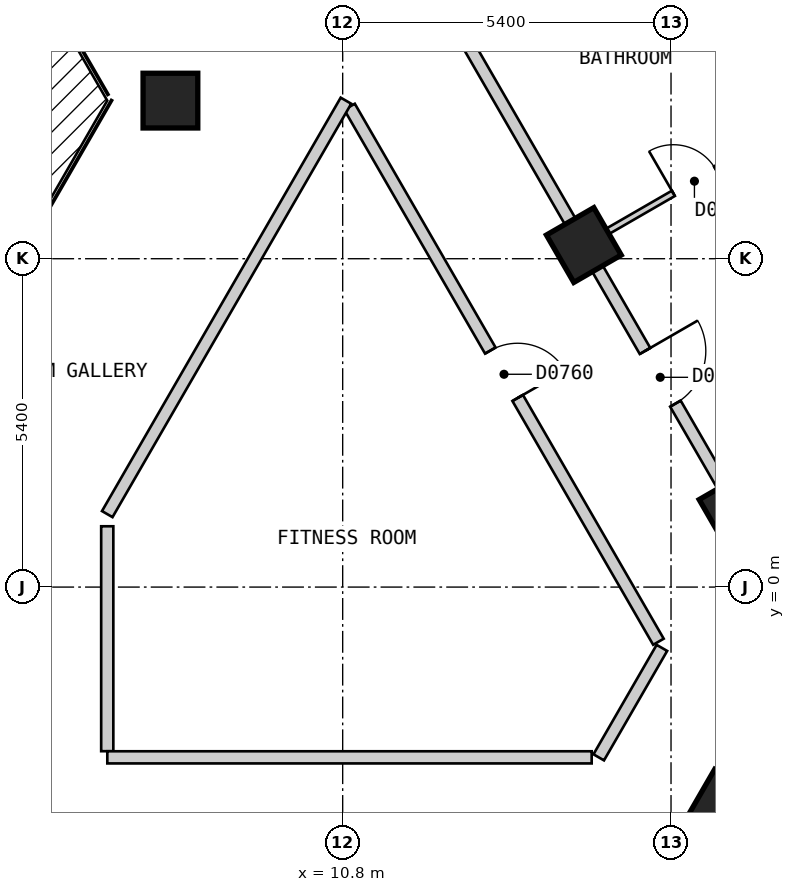
"""IFC4 building model, lengths in metres.
Left out: names, types, materials, properties, quantities, classifications, styles, units other than length and angle.
Written with IfcOpenShell. Run it as: python <this file> out.ifc"""

import sys

from ifc_helpers import new_model, si_unit, direction, frame, frame_2d, origin, origin_2d, place, context, subcontext, project, spatial, polyline, rectangle, outline, extrude, element, fill, save


model = new_model("IFC4")
c1 = context("Model", 3, precision=1e-05, world=origin(), true_north=direction((0.0, 1.0)))
c2 = subcontext(c1, "Body", "Model", "MODEL_VIEW")
j1 = project(units=[si_unit("LENGTHUNIT", "METRE"), si_unit("PLANEANGLEUNIT", "RADIAN")], contexts=[c1])
p1 = place(None, origin())
s1 = spatial("IfcSite", under=j1, at=p1, CompositionType="ELEMENT")
p2 = place(p1, origin())
s2 = spatial("IfcBuilding", under=s1, at=p2, CompositionType="ELEMENT")
p3 = place(p2, frame((0.0, 0.0, 105.0)))
s3 = spatial("IfcBuildingStorey", under=s2, at=p3, CompositionType="ELEMENT", Elevation=105.0)
for number, where, z_axis, x_axis in (
    (1, (17.083, -3.612, 0.0), (0.0, 0.0, 1.0), (0.5, 0.866, 0.0)),
    (2, (17.278, 1.274, 0.0), (0.0, 0.0, 1.0), (-0.5, 0.866, 0.0)),
    (3, (14.766, 5.625, 0.0), (0.0, 0.0, 1.0), (-0.5, 0.866, 0.0)),
    (4, (7.967, 8.0, 0.0), (0.0, 0.0, 1.0), (1.0, 0.0, 0.0)),
):
    element("IfcColumn", number, at=place(p3, frame(where, z_axis=z_axis, x_axis=x_axis)), inside=s3, PredefinedType="COLUMN", context=c2, shape_type="SweptSolid", body=[
        extrude(rectangle(XDim=0.9, YDim=0.9, at=origin_2d()), origin(), (0.0, 0.0, 1.0), 3.0),
    ])
p4 = place(p3, frame((29.027, 1.425, 0.0), z_axis=(0.0, 0.0, 1.0), x_axis=(-0.500027479704, 0.866009537788, 0.0)))
e5 = element("IfcWall", 5, at=p4, inside=s3, PredefinedType="SOLIDWALL", context=c2, shape_type="SweptSolid", body=[
    extrude(outline(polyline([(0.0, -0.15), (26.559, -0.15), (26.478, 0.15), (0.08, 0.15), (0.0, -0.15)])), origin(), (0.0, 0.0, 1.0), 2.6),
])
p5 = place(p4, frame((1.227, 0.0, 0.15)))
e6 = element("IfcOpeningElement", 6, at=p5, cuts=e5, PredefinedType="OPENING", context=c2, shape_type="SweptSolid", body=[
    extrude(rectangle(XDim=1.5, YDim=2.1, at=frame_2d((0.75, 1.05))), frame((0.0, 0.16, 0.0), z_axis=(0.0, -1.0, 0.0), x_axis=(1.0, 0.0, 0.0)), (0.0, 0.0, 1.0), 0.32),
])
p6 = place(p4, frame((3.738, 0.0, 0.15)))
e7 = element("IfcOpeningElement", 7, at=p6, cuts=e5, PredefinedType="OPENING", context=c2, shape_type="SweptSolid", body=[
    extrude(rectangle(XDim=1.5, YDim=2.1, at=frame_2d((0.75, 1.05))), frame((0.0, 0.16, 0.0), z_axis=(0.0, -1.0, 0.0), x_axis=(1.0, 0.0, 0.0)), (0.0, 0.0, 1.0), 0.32),
])
p7 = place(p4, frame((6.25, 0.0, 0.15)))
e8 = element("IfcOpeningElement", 8, at=p7, cuts=e5, PredefinedType="OPENING", context=c2, shape_type="SweptSolid", body=[
    extrude(rectangle(XDim=1.5, YDim=2.1, at=frame_2d((0.75, 1.05))), frame((0.0, 0.16, 0.0), z_axis=(0.0, -1.0, 0.0), x_axis=(1.0, 0.0, 0.0)), (0.0, 0.0, 1.0), 0.32),
])
p8 = place(p4, frame((8.761, 0.0, 0.15)))
e9 = element("IfcOpeningElement", 9, at=p8, cuts=e5, PredefinedType="OPENING", context=c2, shape_type="SweptSolid", body=[
    extrude(rectangle(XDim=1.5, YDim=2.1, at=frame_2d((0.75, 1.05))), frame((0.0, 0.16, 0.0), z_axis=(0.0, -1.0, 0.0), x_axis=(1.0, 0.0, 0.0)), (0.0, 0.0, 1.0), 0.32),
])
p9 = place(p4, frame((11.273, 0.0, 0.15)))
e10 = element("IfcOpeningElement", 10, at=p9, cuts=e5, PredefinedType="OPENING", context=c2, shape_type="SweptSolid", body=[
    extrude(rectangle(XDim=1.5, YDim=2.1, at=frame_2d((0.75, 1.05))), frame((0.0, 0.16, 0.0), z_axis=(0.0, -1.0, 0.0), x_axis=(1.0, 0.0, 0.0)), (0.0, 0.0, 1.0), 0.32),
])
p10 = place(p4, frame((13.785, 0.0, 0.15)))
e11 = element("IfcOpeningElement", 11, at=p10, cuts=e5, PredefinedType="OPENING", context=c2, shape_type="SweptSolid", body=[
    extrude(rectangle(XDim=1.5, YDim=2.1, at=frame_2d((0.75, 1.05))), frame((0.0, 0.16, 0.0), z_axis=(0.0, -1.0, 0.0), x_axis=(1.0, 0.0, 0.0)), (0.0, 0.0, 1.0), 0.32),
])
p11 = place(p4, frame((16.296, 0.0, 0.15)))
e12 = element("IfcOpeningElement", 12, at=p11, cuts=e5, PredefinedType="OPENING", context=c2, shape_type="SweptSolid", body=[
    extrude(rectangle(XDim=1.5, YDim=2.1, at=frame_2d((0.75, 1.05))), frame((0.0, 0.16, 0.0), z_axis=(0.0, -1.0, 0.0), x_axis=(1.0, 0.0, 0.0)), (0.0, 0.0, 1.0), 0.32),
])
p12 = place(p4, frame((18.807, 0.0, 0.15)))
e13 = element("IfcOpeningElement", 13, at=p12, cuts=e5, PredefinedType="OPENING", context=c2, shape_type="SweptSolid", body=[
    extrude(rectangle(XDim=1.5, YDim=2.1, at=frame_2d((0.75, 1.05))), frame((0.0, 0.16, 0.0), z_axis=(0.0, -1.0, 0.0), x_axis=(1.0, 0.0, 0.0)), (0.0, 0.0, 1.0), 0.32),
])
p13 = place(p4, frame((21.319, 0.0, 0.15)))
e14 = element("IfcOpeningElement", 14, at=p13, cuts=e5, PredefinedType="OPENING", context=c2, shape_type="SweptSolid", body=[
    extrude(rectangle(XDim=1.5, YDim=2.1, at=frame_2d((0.75, 1.05))), frame((0.0, 0.16, 0.0), z_axis=(0.0, -1.0, 0.0), x_axis=(1.0, 0.0, 0.0)), (0.0, 0.0, 1.0), 0.32),
])
p14 = place(p4, frame((23.831, 0.0, 0.15)))
e15 = element("IfcOpeningElement", 15, at=p14, cuts=e5, PredefinedType="OPENING", context=c2, shape_type="SweptSolid", body=[
    extrude(rectangle(XDim=1.5, YDim=2.1, at=frame_2d((0.75, 1.05))), frame((0.0, 0.16, 0.0), z_axis=(0.0, -1.0, 0.0), x_axis=(1.0, 0.0, 0.0)), (0.0, 0.0, 1.0), 0.32),
])
p15 = place(p3, frame((10.913, 7.899, 0.0), z_axis=(0.0, 0.0, 1.0), x_axis=(0.500028940566, -0.866008694296, 0.0)))
e16 = element("IfcWall", 16, at=p15, inside=s3, PredefinedType="PARTITIONING", context=c2, shape_type="SweptSolid", body=[
    extrude(rectangle(XDim=10.159, YDim=0.2, at=frame_2d((5.08, 0.0))), origin(), (0.0, 0.0, 1.0), 2.6),
])
p16 = place(p15, frame((4.63, 0.0, 0.0)))
e17 = element("IfcOpeningElement", 17, at=p16, cuts=e16, PredefinedType="OPENING", context=c2, shape_type="SweptSolid", body=[
    extrude(rectangle(XDim=0.9, YDim=2.1, at=frame_2d((0.45, 1.05))), frame((0.0, 0.11, 0.0), z_axis=(0.0, -1.0, 0.0), x_axis=(1.0, 0.0, 0.0)), (0.0, 0.0, 1.0), 0.22),
])
p17 = place(p3, frame((8.488, 16.5, 0.0), z_axis=(0.0, 0.0, 1.0), x_axis=(0.499986836607, -0.86603300354, 0.0)))
e18 = element("IfcWall", 18, at=p17, inside=s3, PredefinedType="PARTITIONING", context=c2, shape_type="SweptSolid", body=[
    extrude(rectangle(XDim=20.09, YDim=0.2, at=frame_2d((10.045, 0.0))), origin(), (0.0, 0.0, 1.0), 2.6),
])
p18 = place(p17, frame((14.569, 0.0, 0.0)))
e19 = element("IfcOpeningElement", 19, at=p18, cuts=e18, PredefinedType="OPENING", context=c2, shape_type="SweptSolid", body=[
    extrude(rectangle(XDim=1.0, YDim=2.1, at=frame_2d((0.5, 1.05))), frame((0.0, 0.11, 0.0), z_axis=(0.0, -1.0, 0.0), x_axis=(1.0, 0.0, 0.0)), (0.0, 0.0, 1.0), 0.22),
])
p19 = place(p17, frame((4.547, 0.0, 0.0)))
e20 = element("IfcOpeningElement", 20, at=p19, cuts=e18, PredefinedType="OPENING", context=c2, shape_type="SweptSolid", body=[
    extrude(rectangle(XDim=1.0, YDim=2.1, at=frame_2d((0.5, 1.05))), frame((0.0, 0.11, 0.0), z_axis=(0.0, -1.0, 0.0), x_axis=(1.0, 0.0, 0.0)), (0.0, 0.0, 1.0), 0.22),
])
p20 = place(p3, frame((6.928, 1.0, 0.0), z_axis=(0.0, 0.0, 1.0), x_axis=(0.0, -1.0, 0.0)))
e21 = element("IfcWall", 21, at=p20, inside=s3, PredefinedType="PARTITIONING", context=c2, shape_type="SweptSolid", body=[
    extrude(rectangle(XDim=3.699, YDim=0.2, at=frame_2d((1.85, 0.0))), origin(), (0.0, 0.0, 1.0), 2.6),
])
p21 = place(p3, frame((6.929, -2.8, 0.0), z_axis=(0.0, 0.0, 1.0), x_axis=(1.0, 0.0, 0.0)))
e22 = element("IfcWall", 22, at=p21, inside=s3, PredefinedType="PARTITIONING", context=c2, shape_type="SweptSolid", body=[
    extrude(rectangle(XDim=7.966, YDim=0.2, at=frame_2d((3.983, 0.0))), origin(), (0.0, 0.0, 1.0), 2.6),
])
p22 = place(p3, frame((6.928, 1.2, 0.0), z_axis=(0.0, 0.0, 1.0), x_axis=(0.500055327065, 0.865993458332, 0.0)))
e23 = element("IfcWall", 23, at=p22, inside=s3, PredefinedType="PARTITIONING", context=c2, shape_type="SweptSolid", body=[
    extrude(rectangle(XDim=7.851, YDim=0.2, at=frame_2d((3.926, 0.0))), origin(), (0.0, 0.0, 1.0), 2.6),
])
p23 = place(p3, frame((15.011, -2.8, 0.0), z_axis=(0.0, 0.0, 1.0), x_axis=(0.499929208183, 0.866066271601, 0.0)))
e24 = element("IfcWall", 24, at=p23, inside=s3, PredefinedType="PARTITIONING", context=c2, shape_type="SweptSolid", body=[
    extrude(rectangle(XDim=2.078, YDim=0.2, at=frame_2d((1.039, 0.0))), origin(), (0.0, 0.0, 1.0), 2.6),
])
p24 = place(p3, frame((15.771, -5.884, 0.0), z_axis=(0.0, 0.0, 1.0), x_axis=(0.499917542299, 0.866073005526, 0.0)))
e25 = element("IfcWall", 25, at=p24, inside=s3, PredefinedType="PARTITIONING", context=c2, shape_type="SweptSolid", body=[
    extrude(rectangle(XDim=5.525, YDim=0.2, at=frame_2d((2.762, 0.0))), origin(), (0.0, 0.0, 1.0), 2.6),
])
p25 = place(p3, frame((15.942, 11.988, 0.0), z_axis=(0.0, 0.0, 1.0), x_axis=(0.499995794706, -0.866027831699, 0.0)))
e26 = element("IfcWall", 26, at=p25, inside=s3, PredefinedType="PARTITIONING", context=c2, shape_type="SweptSolid", body=[
    extrude(rectangle(XDim=4.922, YDim=0.1, at=frame_2d((2.461, 0.0))), origin(), (0.0, 0.0, 1.0), 2.6),
])
p26 = place(p3, frame((14.853, 5.675, 0.0), z_axis=(0.0, 0.0, 1.0), x_axis=(0.866016855193, 0.500014806302, 0.0)))
e27 = element("IfcWall", 27, at=p26, inside=s3, PredefinedType="PARTITIONING", context=c2, shape_type="SweptSolid", body=[
    extrude(rectangle(XDim=10.0, YDim=0.1, at=frame_2d((5.0, 0.0))), origin(), (0.0, 0.0, 1.0), 2.6),
])
p27 = place(p26, frame((1.6, 0.0, 0.0)))
e28 = element("IfcOpeningElement", 28, at=p27, cuts=e27, PredefinedType="OPENING", context=c2, shape_type="SweptSolid", body=[
    extrude(rectangle(XDim=0.8, YDim=2.1, at=frame_2d((0.4, 1.05))), frame((0.0, 0.06, 0.0), z_axis=(0.0, -1.0, 0.0), x_axis=(1.0, 0.0, 0.0)), (0.0, 0.0, 1.0), 0.12),
])
p28 = place(p26, frame((6.6, 0.0, 0.0)))
e29 = element("IfcOpeningElement", 29, at=p28, cuts=e27, PredefinedType="OPENING", context=c2, shape_type="SweptSolid", body=[
    extrude(rectangle(XDim=0.9, YDim=2.1, at=frame_2d((0.45, 1.05))), frame((0.0, 0.06, 0.0), z_axis=(0.0, -1.0, 0.0), x_axis=(1.0, 0.0, 0.0)), (0.0, 0.0, 1.0), 0.12),
])
p29 = place(p18, origin())
e30 = element("IfcDoor", 30, at=p29, inside=s3, OperationType="SINGLE_SWING_LEFT", PredefinedType="DOOR", context=c2, shape_type="SweptSolid", body=[
    extrude(rectangle(XDim=1.0, YDim=2.1, at=frame_2d((0.5, 1.05))), frame((0.0, 0.025, 0.0), z_axis=(0.0, -1.0, 0.0), x_axis=(1.0, 0.0, 0.0)), (0.0, 0.0, 1.0), 0.05),
])
fill(e19, e30)
p30 = place(p27, origin())
e31 = element("IfcDoor", 31, at=p30, inside=s3, OperationType="SINGLE_SWING_LEFT", PredefinedType="DOOR", context=c2, shape_type="SweptSolid", body=[
    extrude(rectangle(XDim=0.8, YDim=2.1, at=frame_2d((0.4, 1.05))), frame((0.0, 0.025, 0.0), z_axis=(0.0, -1.0, 0.0), x_axis=(1.0, 0.0, 0.0)), (0.0, 0.0, 1.0), 0.05),
])
fill(e28, e31)
p31 = place(p16, origin())
e32 = element("IfcDoor", 32, at=p31, inside=s3, OperationType="SINGLE_SWING_RIGHT", PredefinedType="DOOR", context=c2, shape_type="SweptSolid", body=[
    extrude(rectangle(XDim=0.9, YDim=2.1, at=frame_2d((0.45, 1.05))), frame((0.0, 0.025, 0.0), z_axis=(0.0, -1.0, 0.0), x_axis=(1.0, 0.0, 0.0)), (0.0, 0.0, 1.0), 0.05),
])
fill(e17, e32)
save(model, sys.argv[1])
